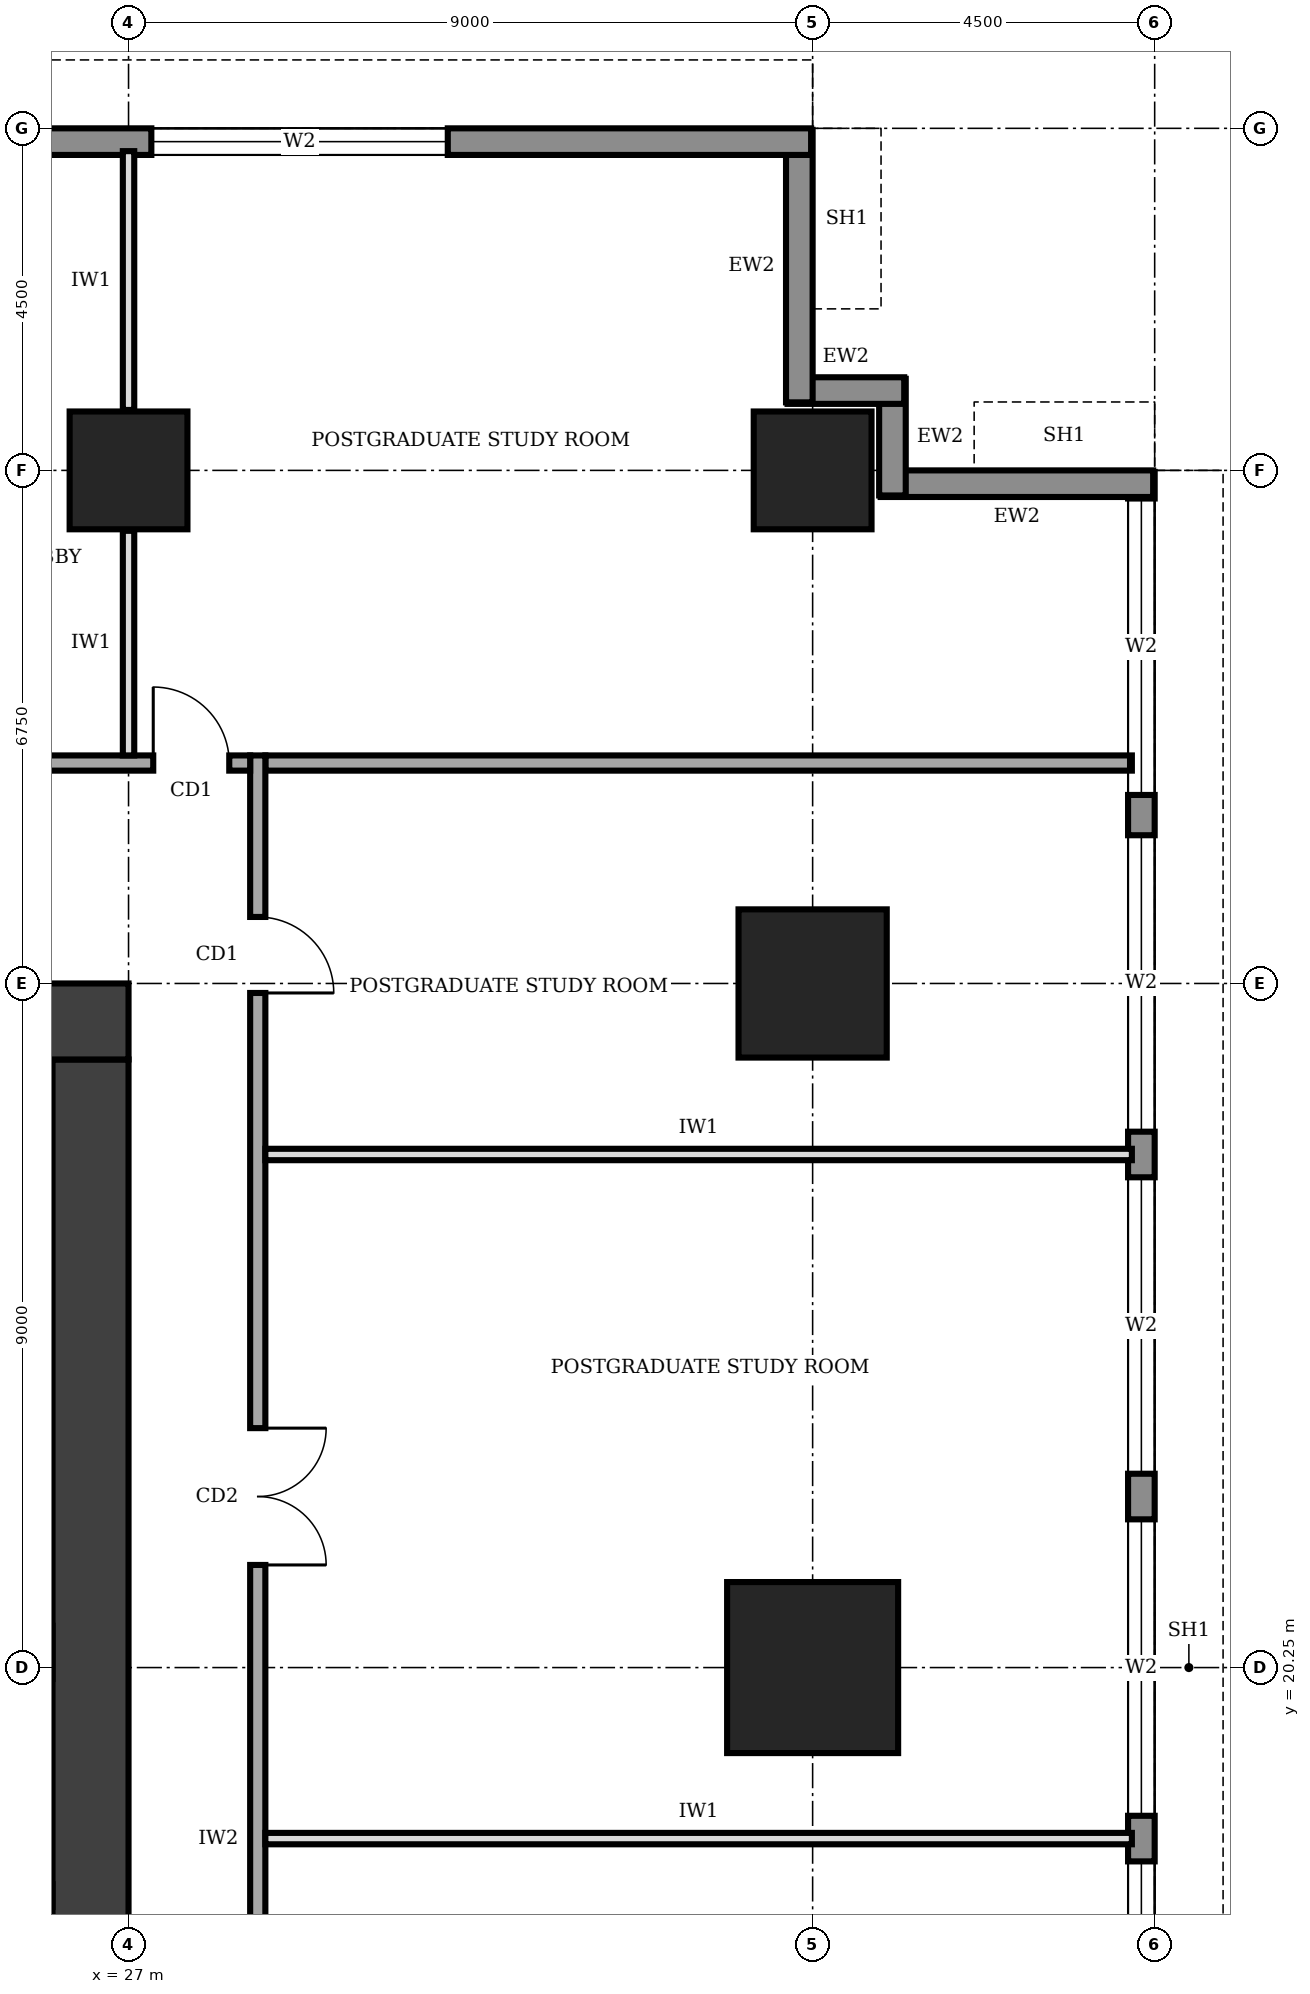
"""IFC4 building model, lengths in metres.
Left out: names, types, materials, properties, quantities, classifications, styles, units other than length and angle.
Written with IfcOpenShell. Run it as: python <this file> out.ifc"""

import sys

from ifc_helpers import new_model, si_unit, direction, frame, frame_2d, origin, origin_2d, place, context, subcontext, project, spatial, rectangle, extrude, element, fill, save


model = new_model("IFC4")
c1 = context("Model", 3, precision=1e-05, world=origin(), true_north=direction((0.0, 1.0)))
c2 = subcontext(c1, "Body", "Model", "MODEL_VIEW")
j1 = project(units=[si_unit("LENGTHUNIT", "METRE"), si_unit("PLANEANGLEUNIT", "RADIAN")], contexts=[c1])
p1 = place(None, origin())
s1 = spatial("IfcSite", under=j1, at=p1, CompositionType="ELEMENT")
p2 = place(p1, origin())
s2 = spatial("IfcBuilding", under=s1, at=p2, CompositionType="ELEMENT")
p3 = place(p2, frame((0.0, 0.0, 233.0)))
s3 = spatial("IfcBuildingStorey", under=s2, at=p3, CompositionType="ELEMENT", Elevation=233.0)
p4 = place(p3, frame((26.5, 12.25, 0.0), z_axis=(0.0, 0.0, 1.0), x_axis=(0.0, 1.0, 0.0)))
e1 = element("IfcWall", 1, at=p4, inside=s3, PredefinedType="SHEAR", context=c2, shape_type="SweptSolid", body=[
    extrude(rectangle(XDim=16.0, YDim=1.0, at=frame_2d((8.0, 0.0))), origin(), (0.0, 0.0, 1.0), 4.0),
])
p5 = place(p3, frame((27.0, 28.75, 0.0), z_axis=(0.0, 0.0, 1.0), x_axis=(-1.0, 0.0, 0.0)))
e2 = element("IfcWall", 2, at=p5, inside=s3, PredefinedType="SHEAR", context=c2, shape_type="SweptSolid", body=[
    extrude(rectangle(XDim=13.5, YDim=1.0, at=frame_2d((6.75, 0.0))), origin(), (0.0, 0.0, 1.0), 4.0),
])
p6 = place(p5, frame((4.75, 0.0, 0.0)))
e3 = element("IfcOpeningElement", 3, at=p6, cuts=e2, PredefinedType="OPENING", context=c2, shape_type="SweptSolid", body=[
    extrude(rectangle(XDim=1.8, YDim=2.1, at=frame_2d((0.9, 1.05))), frame((0.0, 0.51, 0.0), z_axis=(0.0, -1.0, 0.0), x_axis=(1.0, 0.0, 0.0)), (0.0, 0.0, 1.0), 1.02),
])
p7 = place(p3, frame((36.0, 20.25, 0.0), z_axis=(0.0, 0.0, 1.0), x_axis=(1.0, 0.0, 0.0)))
e4 = element("IfcColumn", 4, at=p7, inside=s3, PredefinedType="COLUMN", context=c2, shape_type="SweptSolid", body=[
    extrude(rectangle(XDim=2.25, YDim=2.25, at=origin_2d()), origin(), (0.0, 0.0, 1.0), 4.0),
])
p8 = place(p3, frame((36.0, 29.25, 0.0), z_axis=(0.0, 0.0, 1.0), x_axis=(1.0, 0.0, 0.0)))
e5 = element("IfcColumn", 5, at=p8, inside=s3, PredefinedType="COLUMN", context=c2, shape_type="SweptSolid", body=[
    extrude(rectangle(XDim=1.95, YDim=1.95, at=origin_2d()), origin(), (0.0, 0.0, 1.0), 4.0),
])
for number, where, z_axis, x_axis in (
    (6, (27.0, 36.0, 0.0), (0.0, 0.0, 1.0), (1.0, 0.0, 0.0)),
    (7, (36.0, 36.0, 0.0), (0.0, 0.0, 1.0), (1.0, 0.0, 0.0)),
):
    element("IfcColumn", number, at=place(p3, frame(where, z_axis=z_axis, x_axis=x_axis)), inside=s3, PredefinedType="COLUMN", context=c2, shape_type="SweptSolid", body=[
        extrude(rectangle(XDim=1.55, YDim=1.55, at=origin_2d()), origin(), (0.0, 0.0, 1.0), 4.0),
    ])
p9 = place(p3, frame((40.325, 4.52, 0.0), z_axis=(0.0, 0.0, 1.0), x_axis=(0.0, 1.0, 0.0)))
e8 = element("IfcWall", 8, at=p9, inside=s3, PredefinedType="STANDARD", context=c2, shape_type="SweptSolid", body=[
    extrude(rectangle(XDim=31.46, YDim=0.35, at=frame_2d((15.73, 0.0))), origin(), (0.0, 0.0, 1.0), 3.75),
])
p10 = place(p9, frame((4.78, 0.0, 0.6)))
e9 = element("IfcOpeningElement", 9, at=p10, cuts=e8, PredefinedType="OPENING", context=c2, shape_type="SweptSolid", body=[
    extrude(rectangle(XDim=3.9, YDim=2.6, at=frame_2d((1.95, 1.3))), frame((0.0, 0.185, 0.0), z_axis=(0.0, -1.0, 0.0), x_axis=(1.0, 0.0, 0.0)), (0.0, 0.0, 1.0), 0.37),
])
p11 = place(p9, frame((9.28, 0.0, 0.6)))
e10 = element("IfcOpeningElement", 10, at=p11, cuts=e8, PredefinedType="OPENING", context=c2, shape_type="SweptSolid", body=[
    extrude(rectangle(XDim=3.9, YDim=2.6, at=frame_2d((1.95, 1.3))), frame((0.0, 0.185, 0.0), z_axis=(0.0, -1.0, 0.0), x_axis=(1.0, 0.0, 0.0)), (0.0, 0.0, 1.0), 0.37),
])
p12 = place(p9, frame((13.78, 0.0, 0.6)))
e11 = element("IfcOpeningElement", 11, at=p12, cuts=e8, PredefinedType="OPENING", context=c2, shape_type="SweptSolid", body=[
    extrude(rectangle(XDim=3.9, YDim=2.6, at=frame_2d((1.95, 1.3))), frame((0.0, 0.185, 0.0), z_axis=(0.0, -1.0, 0.0), x_axis=(1.0, 0.0, 0.0)), (0.0, 0.0, 1.0), 0.37),
])
p13 = place(p9, frame((18.28, 0.0, 0.6)))
e12 = element("IfcOpeningElement", 12, at=p13, cuts=e8, PredefinedType="OPENING", context=c2, shape_type="SweptSolid", body=[
    extrude(rectangle(XDim=3.9, YDim=2.6, at=frame_2d((1.95, 1.3))), frame((0.0, 0.185, 0.0), z_axis=(0.0, -1.0, 0.0), x_axis=(1.0, 0.0, 0.0)), (0.0, 0.0, 1.0), 0.37),
])
p14 = place(p9, frame((22.78, 0.0, 0.6)))
e13 = element("IfcOpeningElement", 13, at=p14, cuts=e8, PredefinedType="OPENING", context=c2, shape_type="SweptSolid", body=[
    extrude(rectangle(XDim=3.9, YDim=2.6, at=frame_2d((1.95, 1.3))), frame((0.0, 0.185, 0.0), z_axis=(0.0, -1.0, 0.0), x_axis=(1.0, 0.0, 0.0)), (0.0, 0.0, 1.0), 0.37),
])
p15 = place(p9, frame((27.21, 0.0, 0.6)))
e14 = element("IfcOpeningElement", 14, at=p15, cuts=e8, PredefinedType="OPENING", context=c2, shape_type="SweptSolid", body=[
    extrude(rectangle(XDim=3.9, YDim=2.6, at=frame_2d((1.95, 1.3))), frame((0.0, 0.185, 0.0), z_axis=(0.0, -1.0, 0.0), x_axis=(1.0, 0.0, 0.0)), (0.0, 0.0, 1.0), 0.37),
])
p16 = place(p3, frame((40.48, 35.825, 0.0), z_axis=(0.0, 0.0, 1.0), x_axis=(-1.0, 0.0, 0.0)))
e15 = element("IfcWall", 15, at=p16, inside=s3, PredefinedType="STANDARD", context=c2, shape_type="SweptSolid", body=[
    extrude(rectangle(XDim=3.585, YDim=0.35, at=frame_2d((1.792, 0.0))), origin(), (0.0, 0.0, 1.0), 2.85),
])
for number, where, z_axis, x_axis in (
    (16, (37.05, 35.67, 0.0), (0.0, 0.0, 1.0), (0.0, 1.0, 0.0)),
    (17, (37.205, 37.05, 0.0), (0.0, 0.0, 1.0), (-1.0, 0.0, 0.0)),
):
    element("IfcWall", number, at=place(p3, frame(where, z_axis=z_axis, x_axis=x_axis)), inside=s3, PredefinedType="STANDARD", context=c2, shape_type="SweptSolid", body=[
        extrude(rectangle(XDim=1.535, YDim=0.35, at=frame_2d((0.768, 0.0))), origin(), (0.0, 0.0, 1.0), 3.75),
    ])
p17 = place(p3, frame((35.825, 36.895, 0.0), z_axis=(0.0, 0.0, 1.0), x_axis=(0.0, 1.0, 0.0)))
e18 = element("IfcWall", 18, at=p17, inside=s3, PredefinedType="STANDARD", context=c2, shape_type="SweptSolid", body=[
    extrude(rectangle(XDim=3.585, YDim=0.35, at=frame_2d((1.792, 0.0))), origin(), (0.0, 0.0, 1.0), 2.85),
])
p18 = place(p3, frame((35.98, 40.325, 0.0), z_axis=(0.0, 0.0, 1.0), x_axis=(-1.0, 0.0, 0.0)))
e19 = element("IfcWall", 19, at=p18, inside=s3, PredefinedType="STANDARD", context=c2, shape_type="SweptSolid", body=[
    extrude(rectangle(XDim=31.46, YDim=0.35, at=frame_2d((15.73, 0.0))), origin(), (0.0, 0.0, 1.0), 3.75),
])
p19 = place(p18, frame((27.21, 0.0, 0.6)))
e20 = element("IfcOpeningElement", 20, at=p19, cuts=e19, PredefinedType="OPENING", context=c2, shape_type="SweptSolid", body=[
    extrude(rectangle(XDim=3.9, YDim=2.6, at=frame_2d((1.95, 1.3))), frame((0.0, 0.185, 0.0), z_axis=(0.0, -1.0, 0.0), x_axis=(1.0, 0.0, 0.0)), (0.0, 0.0, 1.0), 0.37),
])
p20 = place(p18, frame((22.78, 0.0, 0.6)))
e21 = element("IfcOpeningElement", 21, at=p20, cuts=e19, PredefinedType="OPENING", context=c2, shape_type="SweptSolid", body=[
    extrude(rectangle(XDim=3.9, YDim=2.6, at=frame_2d((1.95, 1.3))), frame((0.0, 0.185, 0.0), z_axis=(0.0, -1.0, 0.0), x_axis=(1.0, 0.0, 0.0)), (0.0, 0.0, 1.0), 0.37),
])
p21 = place(p18, frame((4.78, 0.0, 0.6)))
e22 = element("IfcOpeningElement", 22, at=p21, cuts=e19, PredefinedType="OPENING", context=c2, shape_type="SweptSolid", body=[
    extrude(rectangle(XDim=3.9, YDim=2.6, at=frame_2d((1.95, 1.3))), frame((0.0, 0.185, 0.0), z_axis=(0.0, -1.0, 0.0), x_axis=(1.0, 0.0, 0.0)), (0.0, 0.0, 1.0), 0.37),
])
p22 = place(p3, frame((28.7, 9.2, 0.0), z_axis=(0.0, 0.0, 1.0), x_axis=(0.0, 1.0, 0.0)))
e23 = element("IfcWall", 23, at=p22, inside=s3, PredefinedType="SOLIDWALL", context=c2, shape_type="SweptSolid", body=[
    extrude(rectangle(XDim=23.05, YDim=0.2, at=frame_2d((11.525, 0.0))), origin(), (0.0, 0.0, 1.0), 3.75),
])
p23 = place(p22, frame((3.4, 0.0, 0.0)))
e24 = element("IfcOpeningElement", 24, at=p23, cuts=e23, PredefinedType="OPENING", context=c2, shape_type="SweptSolid", body=[
    extrude(rectangle(XDim=1.8, YDim=2.1, at=frame_2d((0.9, 1.05))), frame((0.0, 0.11, 0.0), z_axis=(0.0, -1.0, 0.0), x_axis=(1.0, 0.0, 0.0)), (0.0, 0.0, 1.0), 0.22),
])
p24 = place(p22, frame((12.4, 0.0, 0.0)))
e25 = element("IfcOpeningElement", 25, at=p24, cuts=e23, PredefinedType="OPENING", context=c2, shape_type="SweptSolid", body=[
    extrude(rectangle(XDim=1.8, YDim=2.1, at=frame_2d((0.9, 1.05))), frame((0.0, 0.11, 0.0), z_axis=(0.0, -1.0, 0.0), x_axis=(1.0, 0.0, 0.0)), (0.0, 0.0, 1.0), 0.22),
])
p25 = place(p22, frame((19.925, 0.0, 0.0)))
e26 = element("IfcOpeningElement", 26, at=p25, cuts=e23, PredefinedType="OPENING", context=c2, shape_type="SweptSolid", body=[
    extrude(rectangle(XDim=1.0, YDim=2.1, at=frame_2d((0.5, 1.05))), frame((0.0, 0.11, 0.0), z_axis=(0.0, -1.0, 0.0), x_axis=(1.0, 0.0, 0.0)), (0.0, 0.0, 1.0), 0.22),
])
p26 = place(p3, frame((28.6, 32.15, 0.0), z_axis=(0.0, 0.0, 1.0), x_axis=(-1.0, 0.0, 0.0)))
e27 = element("IfcWall", 27, at=p26, inside=s3, PredefinedType="SOLIDWALL", context=c2, shape_type="SweptSolid", body=[
    extrude(rectangle(XDim=16.9, YDim=0.2, at=frame_2d((8.45, 0.0))), origin(), (0.0, 0.0, 1.0), 3.75),
])
p27 = place(p26, frame((12.85, 0.0, 0.0)))
e28 = element("IfcOpeningElement", 28, at=p27, cuts=e27, PredefinedType="OPENING", context=c2, shape_type="SweptSolid", body=[
    extrude(rectangle(XDim=1.8, YDim=2.1, at=frame_2d((0.9, 1.05))), frame((0.0, 0.11, 0.0), z_axis=(0.0, -1.0, 0.0), x_axis=(1.0, 0.0, 0.0)), (0.0, 0.0, 1.0), 0.22),
])
p28 = place(p26, frame((5.6, 0.0, 0.0)))
e29 = element("IfcOpeningElement", 29, at=p28, cuts=e27, PredefinedType="OPENING", context=c2, shape_type="SweptSolid", body=[
    extrude(rectangle(XDim=1.0, YDim=2.1, at=frame_2d((0.5, 1.05))), frame((0.0, 0.11, 0.0), z_axis=(0.0, -1.0, 0.0), x_axis=(1.0, 0.0, 0.0)), (0.0, 0.0, 1.0), 0.22),
])
p29 = place(p26, frame((0.275, 0.0, 0.0)))
e30 = element("IfcOpeningElement", 30, at=p29, cuts=e27, PredefinedType="OPENING", context=c2, shape_type="SweptSolid", body=[
    extrude(rectangle(XDim=1.0, YDim=2.1, at=frame_2d((0.5, 1.05))), frame((0.0, 0.11, 0.0), z_axis=(0.0, -1.0, 0.0), x_axis=(1.0, 0.0, 0.0)), (0.0, 0.0, 1.0), 0.22),
])
p30 = place(p3, frame((28.8, 32.15, 0.0), z_axis=(0.0, 0.0, 1.0), x_axis=(1.0, 0.0, 0.0)))
e31 = element("IfcWall", 31, at=p30, inside=s3, PredefinedType="SOLIDWALL", context=c2, shape_type="SweptSolid", body=[
    extrude(rectangle(XDim=11.4, YDim=0.2, at=frame_2d((5.7, 0.0))), origin(), (0.0, 0.0, 1.0), 3.75),
])
p31 = place(p3, frame((27.0, 32.25, 0.0), z_axis=(0.0, 0.0, 1.0), x_axis=(0.0, 1.0, 0.0)))
e32 = element("IfcWall", 32, at=p31, inside=s3, PredefinedType="PARTITIONING", context=c2, shape_type="SweptSolid", body=[
    extrude(rectangle(XDim=2.955, YDim=0.15, at=frame_2d((1.478, 0.0))), origin(), (0.0, 0.0, 1.0), 2.85),
])
p32 = place(p3, frame((27.0, 36.795, 0.0), z_axis=(0.0, 0.0, 1.0), x_axis=(0.0, 1.0, 0.0)))
e33 = element("IfcWall", 33, at=p32, inside=s3, PredefinedType="PARTITIONING", context=c2, shape_type="SweptSolid", body=[
    extrude(rectangle(XDim=3.405, YDim=0.15, at=frame_2d((1.703, 0.0))), origin(), (0.0, 0.0, 1.0), 2.85),
])
for number, where, z_axis, x_axis in (
    (34, (28.8, 18.0, 0.0), (0.0, 0.0, 1.0), (1.0, 0.0, 0.0)),
    (35, (28.8, 27.0, 0.0), (0.0, 0.0, 1.0), (1.0, 0.0, 0.0)),
):
    element("IfcWall", number, at=place(p3, frame(where, z_axis=z_axis, x_axis=x_axis)), inside=s3, PredefinedType="PARTITIONING", context=c2, shape_type="SweptSolid", body=[
        extrude(rectangle(XDim=11.4, YDim=0.15, at=frame_2d((5.7, 0.0))), origin(), (0.0, 0.0, 1.0), 3.75),
    ])
p33 = place(p11, origin())
e36 = element("IfcWindow", 36, at=p33, inside=s3, PartitioningType="SINGLE_PANEL", PredefinedType="WINDOW", context=c2, shape_type="SweptSolid", body=[
    extrude(rectangle(XDim=3.9, YDim=2.6, at=frame_2d((1.95, 1.3))), frame((0.0, 0.03, 0.0), z_axis=(0.0, -1.0, 0.0), x_axis=(1.0, 0.0, 0.0)), (0.0, 0.0, 1.0), 0.06),
])
fill(e10, e36)
p34 = place(p12, origin())
e37 = element("IfcWindow", 37, at=p34, inside=s3, PartitioningType="SINGLE_PANEL", PredefinedType="WINDOW", context=c2, shape_type="SweptSolid", body=[
    extrude(rectangle(XDim=3.9, YDim=2.6, at=frame_2d((1.95, 1.3))), frame((0.0, 0.03, 0.0), z_axis=(0.0, -1.0, 0.0), x_axis=(1.0, 0.0, 0.0)), (0.0, 0.0, 1.0), 0.06),
])
fill(e11, e37)
p35 = place(p13, origin())
e38 = element("IfcWindow", 38, at=p35, inside=s3, PartitioningType="SINGLE_PANEL", PredefinedType="WINDOW", context=c2, shape_type="SweptSolid", body=[
    extrude(rectangle(XDim=3.9, YDim=2.6, at=frame_2d((1.95, 1.3))), frame((0.0, 0.03, 0.0), z_axis=(0.0, -1.0, 0.0), x_axis=(1.0, 0.0, 0.0)), (0.0, 0.0, 1.0), 0.06),
])
fill(e12, e38)
p36 = place(p14, origin())
e39 = element("IfcWindow", 39, at=p36, inside=s3, PartitioningType="SINGLE_PANEL", PredefinedType="WINDOW", context=c2, shape_type="SweptSolid", body=[
    extrude(rectangle(XDim=3.9, YDim=2.6, at=frame_2d((1.95, 1.3))), frame((0.0, 0.03, 0.0), z_axis=(0.0, -1.0, 0.0), x_axis=(1.0, 0.0, 0.0)), (0.0, 0.0, 1.0), 0.06),
])
fill(e13, e39)
p37 = place(p15, origin())
e40 = element("IfcWindow", 40, at=p37, inside=s3, PartitioningType="SINGLE_PANEL", PredefinedType="WINDOW", context=c2, shape_type="SweptSolid", body=[
    extrude(rectangle(XDim=3.9, YDim=2.6, at=frame_2d((1.95, 1.3))), frame((0.0, 0.03, 0.0), z_axis=(0.0, -1.0, 0.0), x_axis=(1.0, 0.0, 0.0)), (0.0, 0.0, 1.0), 0.06),
])
fill(e14, e40)
p38 = place(p21, origin())
e41 = element("IfcWindow", 41, at=p38, inside=s3, PartitioningType="SINGLE_PANEL", PredefinedType="WINDOW", context=c2, shape_type="SweptSolid", body=[
    extrude(rectangle(XDim=3.9, YDim=2.6, at=frame_2d((1.95, 1.3))), frame((0.0, 0.03, 0.0), z_axis=(0.0, -1.0, 0.0), x_axis=(1.0, 0.0, 0.0)), (0.0, 0.0, 1.0), 0.06),
])
fill(e22, e41)
p39 = place(p24, frame((1.8, 0.0, 0.0), z_axis=(0.0, 0.0, 1.0), x_axis=(-1.0, 0.0, 0.0)))
e42 = element("IfcDoor", 42, at=p39, inside=s3, OperationType="DOUBLE_DOOR_SINGLE_SWING", PredefinedType="DOOR", context=c2, shape_type="SweptSolid", body=[
    extrude(rectangle(XDim=1.8, YDim=2.1, at=frame_2d((0.9, 1.05))), frame((0.0, 0.025, 0.0), z_axis=(0.0, -1.0, 0.0), x_axis=(1.0, 0.0, 0.0)), (0.0, 0.0, 1.0), 0.05),
])
fill(e25, e42)
p40 = place(p25, frame((1.0, 0.0, 0.0), z_axis=(0.0, 0.0, 1.0), x_axis=(-1.0, 0.0, 0.0)))
e43 = element("IfcDoor", 43, at=p40, inside=s3, OperationType="SINGLE_SWING_RIGHT", PredefinedType="DOOR", context=c2, shape_type="SweptSolid", body=[
    extrude(rectangle(XDim=1.0, YDim=2.1, at=frame_2d((0.5, 1.05))), frame((0.0, 0.025, 0.0), z_axis=(0.0, -1.0, 0.0), x_axis=(1.0, 0.0, 0.0)), (0.0, 0.0, 1.0), 0.05),
])
fill(e26, e43)
p41 = place(p29, frame((1.0, 0.0, 0.0), z_axis=(0.0, 0.0, 1.0), x_axis=(-1.0, 0.0, 0.0)))
e44 = element("IfcDoor", 44, at=p41, inside=s3, OperationType="SINGLE_SWING_LEFT", PredefinedType="DOOR", context=c2, shape_type="SweptSolid", body=[
    extrude(rectangle(XDim=1.0, YDim=2.1, at=frame_2d((0.5, 1.05))), frame((0.0, 0.025, 0.0), z_axis=(0.0, -1.0, 0.0), x_axis=(1.0, 0.0, 0.0)), (0.0, 0.0, 1.0), 0.05),
])
fill(e30, e44)
save(model, sys.argv[1])
